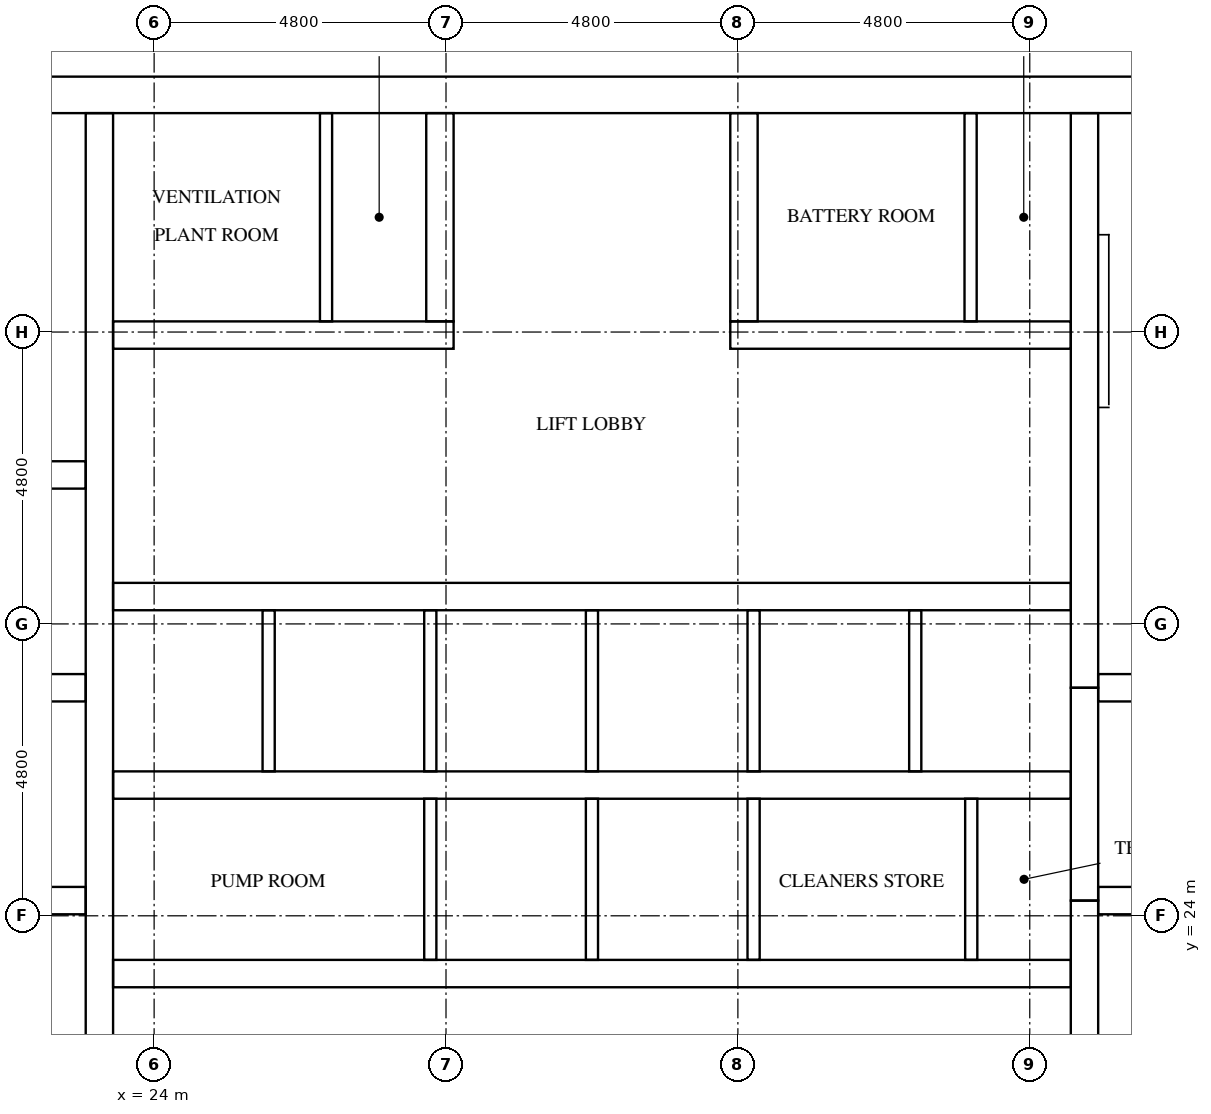
"""IFC4 building model, lengths in metres.
Left out: names, types, materials, properties, quantities, classifications, styles, units other than length and angle.
Written with IfcOpenShell. Run it as: python <this file> out.ifc"""

import sys

from ifc_helpers import new_model, si_unit, direction, frame, frame_2d, origin, place, context, subcontext, project, spatial, rectangle, extrude, element, fill, save


model = new_model("IFC4")
c1 = context("Model", 3, precision=1e-05, world=origin(), true_north=direction((0.0, 1.0)))
c2 = subcontext(c1, "Body", "Model", "MODEL_VIEW")
j1 = project(units=[si_unit("LENGTHUNIT", "METRE"), si_unit("PLANEANGLEUNIT", "RADIAN")], contexts=[c1])
p1 = place(None, origin())
s1 = spatial("IfcSite", under=j1, at=p1, CompositionType="ELEMENT")
p2 = place(p1, origin())
s2 = spatial("IfcBuilding", under=s1, at=p2, CompositionType="ELEMENT")
p3 = place(p2, frame((0.0, 0.0, 259.7)))
s3 = spatial("IfcBuildingStorey", under=s2, at=p3, CompositionType="ELEMENT", Elevation=259.7)
p4 = place(p3, frame((15.0, 37.5, 0.0), z_axis=(0.0, 0.0, 1.0), x_axis=(1.0, 0.0, 0.0)))
e1 = element("IfcWall", 1, at=p4, inside=s3, PredefinedType="SHEAR", context=c2, shape_type="SweptSolid", body=[
    extrude(rectangle(XDim=32.4, YDim=0.6, at=frame_2d((16.2, 0.0))), origin(), (0.0, 0.0, 1.0), 3.1),
])
p5 = place(p4, frame((15.3, 0.0, 0.0)))
e2 = element("IfcOpeningElement", 2, at=p5, cuts=e1, PredefinedType="OPENING", context=c2, shape_type="SweptSolid", body=[
    extrude(rectangle(XDim=1.8, YDim=2.1, at=frame_2d((0.9, 1.05))), frame((0.0, 0.31, 0.0), z_axis=(0.0, -1.0, 0.0), x_axis=(1.0, 0.0, 0.0)), (0.0, 0.0, 1.0), 0.62),
])
p6 = place(p4, frame((1.25, 0.0, 0.0)))
e3 = element("IfcOpeningElement", 3, at=p6, cuts=e1, PredefinedType="OPENING", context=c2, shape_type="SweptSolid", body=[
    extrude(rectangle(XDim=1.0, YDim=2.1, at=frame_2d((0.5, 1.05))), frame((0.0, 0.31, 0.0), z_axis=(0.0, -1.0, 0.0), x_axis=(1.0, 0.0, 0.0)), (0.0, 0.0, 1.0), 0.62),
])
p7 = place(p4, frame((4.988, 0.0, 0.0)))
e4 = element("IfcOpeningElement", 4, at=p7, cuts=e1, PredefinedType="OPENING", context=c2, shape_type="SweptSolid", body=[
    extrude(rectangle(XDim=1.0, YDim=2.1, at=frame_2d((0.5, 1.05))), frame((0.0, 0.31, 0.0), z_axis=(0.0, -1.0, 0.0), x_axis=(1.0, 0.0, 0.0)), (0.0, 0.0, 1.0), 0.62),
])
p8 = place(p3, frame((23.1, 15.6, 0.0), z_axis=(0.0, 0.0, 1.0), x_axis=(0.0, 1.0, 0.0)))
e5 = element("IfcWall", 5, at=p8, inside=s3, PredefinedType="SHEAR", context=c2, shape_type="SweptSolid", body=[
    extrude(rectangle(XDim=21.6, YDim=0.45, at=frame_2d((10.8, 0.0))), origin(), (0.0, 0.0, 1.0), 3.1),
])
p9 = place(p3, frame((39.3, 15.6, 0.0), z_axis=(0.0, 0.0, 1.0), x_axis=(0.0, 1.0, 0.0)))
e6 = element("IfcWall", 6, at=p9, inside=s3, PredefinedType="SHEAR", context=c2, shape_type="SweptSolid", body=[
    extrude(rectangle(XDim=8.65, YDim=0.45, at=frame_2d((4.325, 0.0))), origin(), (0.0, 0.0, 1.0), 3.1),
])
p10 = place(p3, frame((39.3, 24.25, 0.0), z_axis=(0.0, 0.0, 1.0), x_axis=(0.0, 1.0, 0.0)))
e7 = element("IfcWall", 7, at=p10, inside=s3, PredefinedType="SHEAR", context=c2, shape_type="SweptSolid", body=[
    extrude(rectangle(XDim=3.5, YDim=0.45, at=frame_2d((1.75, 0.0))), origin(), (0.0, 0.0, 1.0), 3.1),
])
p11 = place(p3, frame((39.3, 27.75, 0.0), z_axis=(0.0, 0.0, 1.0), x_axis=(0.0, 1.0, 0.0)))
e8 = element("IfcWall", 8, at=p11, inside=s3, PredefinedType="SHEAR", context=c2, shape_type="SweptSolid", body=[
    extrude(rectangle(XDim=9.45, YDim=0.45, at=frame_2d((4.725, 0.0))), origin(), (0.0, 0.0, 1.0), 3.1),
])
for number, where, z_axis, x_axis in (
    (9, (19.275, 24.25, 0.0), (0.0, 0.0, 1.0), (1.0, 0.0, 0.0)),
    (10, (19.275, 27.75, 0.0), (0.0, 0.0, 1.0), (1.0, 0.0, 0.0)),
):
    element("IfcWall", number, at=place(p3, frame(where, z_axis=z_axis, x_axis=x_axis)), inside=s3, PredefinedType="SHEAR", context=c2, shape_type="SweptSolid", body=[
        extrude(rectangle(XDim=3.6, YDim=0.45, at=frame_2d((1.8, 0.0))), origin(), (0.0, 0.0, 1.0), 3.1),
    ])
p12 = place(p3, frame((15.6, 31.25, 0.0), z_axis=(0.0, 0.0, 1.0), x_axis=(1.0, 0.0, 0.0)))
e11 = element("IfcWall", 11, at=p12, inside=s3, PredefinedType="SHEAR", context=c2, shape_type="SweptSolid", body=[
    extrude(rectangle(XDim=7.275, YDim=0.45, at=frame_2d((3.637, 0.0))), origin(), (0.0, 0.0, 1.0), 3.1),
])
for number, where, z_axis, x_axis in (
    (12, (39.525, 24.25, 0.0), (0.0, 0.0, 1.0), (1.0, 0.0, 0.0)),
    (13, (39.525, 27.75, 0.0), (0.0, 0.0, 1.0), (1.0, 0.0, 0.0)),
):
    element("IfcWall", number, at=place(p3, frame(where, z_axis=z_axis, x_axis=x_axis)), inside=s3, PredefinedType="SHEAR", context=c2, shape_type="SweptSolid", body=[
        extrude(rectangle(XDim=3.6, YDim=0.45, at=frame_2d((1.8, 0.0))), origin(), (0.0, 0.0, 1.0), 3.1),
    ])
p13 = place(p3, frame((23.325, 23.05, 0.0), z_axis=(0.0, 0.0, 1.0), x_axis=(1.0, 0.0, 0.0)))
e14 = element("IfcWall", 14, at=p13, inside=s3, PredefinedType="SHEAR", context=c2, shape_type="SweptSolid", body=[
    extrude(rectangle(XDim=15.75, YDim=0.45, at=frame_2d((7.875, 0.0))), origin(), (0.0, 0.0, 1.0), 3.1),
])
p14 = place(p13, frame((2.058, 0.0, 0.0)))
e15 = element("IfcOpeningElement", 15, at=p14, cuts=e14, PredefinedType="OPENING", context=c2, shape_type="SweptSolid", body=[
    extrude(rectangle(XDim=1.0, YDim=2.1, at=frame_2d((0.5, 1.05))), frame((0.0, 0.235, 0.0), z_axis=(0.0, -1.0, 0.0), x_axis=(1.0, 0.0, 0.0)), (0.0, 0.0, 1.0), 0.47),
])
p15 = place(p13, frame((11.823, 0.0, 0.0)))
e16 = element("IfcOpeningElement", 16, at=p15, cuts=e14, PredefinedType="OPENING", context=c2, shape_type="SweptSolid", body=[
    extrude(rectangle(XDim=1.0, YDim=2.1, at=frame_2d((0.5, 1.05))), frame((0.0, 0.235, 0.0), z_axis=(0.0, -1.0, 0.0), x_axis=(1.0, 0.0, 0.0)), (0.0, 0.0, 1.0), 0.47),
])
p16 = place(p13, frame((14.481, 0.0, 0.0)))
e17 = element("IfcOpeningElement", 17, at=p16, cuts=e14, PredefinedType="OPENING", context=c2, shape_type="SweptSolid", body=[
    extrude(rectangle(XDim=1.0, YDim=2.1, at=frame_2d((0.5, 1.05))), frame((0.0, 0.235, 0.0), z_axis=(0.0, -1.0, 0.0), x_axis=(1.0, 0.0, 0.0)), (0.0, 0.0, 1.0), 0.47),
])
p17 = place(p3, frame((23.325, 26.15, 0.0), z_axis=(0.0, 0.0, 1.0), x_axis=(1.0, 0.0, 0.0)))
e18 = element("IfcWall", 18, at=p17, inside=s3, PredefinedType="SHEAR", context=c2, shape_type="SweptSolid", body=[
    extrude(rectangle(XDim=15.75, YDim=0.45, at=frame_2d((7.875, 0.0))), origin(), (0.0, 0.0, 1.0), 3.1),
])
p18 = place(p3, frame((23.325, 29.25, 0.0), z_axis=(0.0, 0.0, 1.0), x_axis=(1.0, 0.0, 0.0)))
e19 = element("IfcWall", 19, at=p18, inside=s3, PredefinedType="SHEAR", context=c2, shape_type="SweptSolid", body=[
    extrude(rectangle(XDim=15.75, YDim=0.45, at=frame_2d((7.875, 0.0))), origin(), (0.0, 0.0, 1.0), 3.1),
])
p19 = place(p18, frame((0.679, 0.0, 0.0)))
e20 = element("IfcOpeningElement", 20, at=p19, cuts=e19, PredefinedType="OPENING", context=c2, shape_type="SweptSolid", body=[
    extrude(rectangle(XDim=1.1, YDim=2.1, at=frame_2d((0.55, 1.05))), frame((0.0, 0.235, 0.0), z_axis=(0.0, -1.0, 0.0), x_axis=(1.0, 0.0, 0.0)), (0.0, 0.0, 1.0), 0.47),
])
p20 = place(p18, frame((3.337, 0.0, 0.0)))
e21 = element("IfcOpeningElement", 21, at=p20, cuts=e19, PredefinedType="OPENING", context=c2, shape_type="SweptSolid", body=[
    extrude(rectangle(XDim=1.1, YDim=2.1, at=frame_2d((0.55, 1.05))), frame((0.0, 0.235, 0.0), z_axis=(0.0, -1.0, 0.0), x_axis=(1.0, 0.0, 0.0)), (0.0, 0.0, 1.0), 0.47),
])
p21 = place(p18, frame((5.996, 0.0, 0.0)))
e22 = element("IfcOpeningElement", 22, at=p21, cuts=e19, PredefinedType="OPENING", context=c2, shape_type="SweptSolid", body=[
    extrude(rectangle(XDim=1.1, YDim=2.1, at=frame_2d((0.55, 1.05))), frame((0.0, 0.235, 0.0), z_axis=(0.0, -1.0, 0.0), x_axis=(1.0, 0.0, 0.0)), (0.0, 0.0, 1.0), 0.47),
])
p22 = place(p18, frame((8.654, 0.0, 0.0)))
e23 = element("IfcOpeningElement", 23, at=p22, cuts=e19, PredefinedType="OPENING", context=c2, shape_type="SweptSolid", body=[
    extrude(rectangle(XDim=1.1, YDim=2.1, at=frame_2d((0.55, 1.05))), frame((0.0, 0.235, 0.0), z_axis=(0.0, -1.0, 0.0), x_axis=(1.0, 0.0, 0.0)), (0.0, 0.0, 1.0), 0.47),
])
p23 = place(p18, frame((11.312, 0.0, 0.0)))
e24 = element("IfcOpeningElement", 24, at=p23, cuts=e19, PredefinedType="OPENING", context=c2, shape_type="SweptSolid", body=[
    extrude(rectangle(XDim=1.1, YDim=2.1, at=frame_2d((0.55, 1.05))), frame((0.0, 0.235, 0.0), z_axis=(0.0, -1.0, 0.0), x_axis=(1.0, 0.0, 0.0)), (0.0, 0.0, 1.0), 0.47),
])
p24 = place(p18, frame((13.971, 0.0, 0.0)))
e25 = element("IfcOpeningElement", 25, at=p24, cuts=e19, PredefinedType="OPENING", context=c2, shape_type="SweptSolid", body=[
    extrude(rectangle(XDim=1.1, YDim=2.1, at=frame_2d((0.55, 1.05))), frame((0.0, 0.235, 0.0), z_axis=(0.0, -1.0, 0.0), x_axis=(1.0, 0.0, 0.0)), (0.0, 0.0, 1.0), 0.47),
])
p25 = place(p3, frame((23.325, 33.55, 0.0), z_axis=(0.0, 0.0, 1.0), x_axis=(1.0, 0.0, 0.0)))
e26 = element("IfcWall", 26, at=p25, inside=s3, PredefinedType="SHEAR", context=c2, shape_type="SweptSolid", body=[
    extrude(rectangle(XDim=5.6, YDim=0.45, at=frame_2d((2.8, 0.0))), origin(), (0.0, 0.0, 1.0), 3.1),
])
p26 = place(p25, frame((1.201, 0.0, 0.0)))
e27 = element("IfcOpeningElement", 27, at=p26, cuts=e26, PredefinedType="OPENING", context=c2, shape_type="SweptSolid", body=[
    extrude(rectangle(XDim=1.0, YDim=2.1, at=frame_2d((0.5, 1.05))), frame((0.0, 0.235, 0.0), z_axis=(0.0, -1.0, 0.0), x_axis=(1.0, 0.0, 0.0)), (0.0, 0.0, 1.0), 0.47),
])
p27 = place(p25, frame((3.876, 0.0, 0.0)))
e28 = element("IfcOpeningElement", 28, at=p27, cuts=e26, PredefinedType="OPENING", context=c2, shape_type="SweptSolid", body=[
    extrude(rectangle(XDim=1.0, YDim=2.1, at=frame_2d((0.5, 1.05))), frame((0.0, 0.235, 0.0), z_axis=(0.0, -1.0, 0.0), x_axis=(1.0, 0.0, 0.0)), (0.0, 0.0, 1.0), 0.47),
])
p28 = place(p3, frame((33.475, 33.55, 0.0), z_axis=(0.0, 0.0, 1.0), x_axis=(1.0, 0.0, 0.0)))
e29 = element("IfcWall", 29, at=p28, inside=s3, PredefinedType="SHEAR", context=c2, shape_type="SweptSolid", body=[
    extrude(rectangle(XDim=5.6, YDim=0.45, at=frame_2d((2.8, 0.0))), origin(), (0.0, 0.0, 1.0), 3.1),
])
p29 = place(p28, frame((1.651, 0.0, 0.0)))
e30 = element("IfcOpeningElement", 30, at=p29, cuts=e29, PredefinedType="OPENING", context=c2, shape_type="SweptSolid", body=[
    extrude(rectangle(XDim=1.0, YDim=2.1, at=frame_2d((0.5, 1.05))), frame((0.0, 0.235, 0.0), z_axis=(0.0, -1.0, 0.0), x_axis=(1.0, 0.0, 0.0)), (0.0, 0.0, 1.0), 0.47),
])
p30 = place(p28, frame((4.326, 0.0, 0.0)))
e31 = element("IfcOpeningElement", 31, at=p30, cuts=e29, PredefinedType="OPENING", context=c2, shape_type="SweptSolid", body=[
    extrude(rectangle(XDim=1.0, YDim=2.1, at=frame_2d((0.5, 1.05))), frame((0.0, 0.235, 0.0), z_axis=(0.0, -1.0, 0.0), x_axis=(1.0, 0.0, 0.0)), (0.0, 0.0, 1.0), 0.47),
])
for number, where, z_axis, x_axis in (
    (32, (28.7, 33.775, 0.0), (0.0, 0.0, 1.0), (0.0, 1.0, 0.0)),
    (33, (33.7, 33.775, 0.0), (0.0, 0.0, 1.0), (0.0, 1.0, 0.0)),
):
    element("IfcWall", number, at=place(p3, frame(where, z_axis=z_axis, x_axis=x_axis)), inside=s3, PredefinedType="SHEAR", context=c2, shape_type="SweptSolid", body=[
        extrude(rectangle(XDim=3.425, YDim=0.45, at=frame_2d((1.712, 0.0))), origin(), (0.0, 0.0, 1.0), 3.1),
    ])
p31 = place(p3, frame((25.883, 26.375, 0.0), z_axis=(0.0, 0.0, 1.0), x_axis=(0.0, 1.0, 0.0)))
e34 = element("IfcWall", 34, at=p31, inside=s3, PredefinedType="SOLIDWALL", context=c2, shape_type="SweptSolid", body=[
    extrude(rectangle(XDim=2.65, YDim=0.2, at=frame_2d((1.325, 0.0))), origin(), (0.0, 0.0, 1.0), 3.1),
])
p32 = place(p3, frame((28.542, 23.275, 0.0), z_axis=(0.0, 0.0, 1.0), x_axis=(0.0, 1.0, 0.0)))
e35 = element("IfcWall", 35, at=p32, inside=s3, PredefinedType="SOLIDWALL", context=c2, shape_type="SweptSolid", body=[
    extrude(rectangle(XDim=2.65, YDim=0.2, at=frame_2d((1.325, 0.0))), origin(), (0.0, 0.0, 1.0), 3.1),
])
p33 = place(p3, frame((28.542, 26.375, 0.0), z_axis=(0.0, 0.0, 1.0), x_axis=(0.0, 1.0, 0.0)))
e36 = element("IfcWall", 36, at=p33, inside=s3, PredefinedType="SOLIDWALL", context=c2, shape_type="SweptSolid", body=[
    extrude(rectangle(XDim=2.65, YDim=0.2, at=frame_2d((1.325, 0.0))), origin(), (0.0, 0.0, 1.0), 3.1),
])
p34 = place(p3, frame((31.2, 23.275, 0.0), z_axis=(0.0, 0.0, 1.0), x_axis=(0.0, 1.0, 0.0)))
e37 = element("IfcWall", 37, at=p34, inside=s3, PredefinedType="SOLIDWALL", context=c2, shape_type="SweptSolid", body=[
    extrude(rectangle(XDim=2.65, YDim=0.2, at=frame_2d((1.325, 0.0))), origin(), (0.0, 0.0, 1.0), 3.1),
])
p35 = place(p3, frame((31.2, 26.375, 0.0), z_axis=(0.0, 0.0, 1.0), x_axis=(0.0, 1.0, 0.0)))
e38 = element("IfcWall", 38, at=p35, inside=s3, PredefinedType="SOLIDWALL", context=c2, shape_type="SweptSolid", body=[
    extrude(rectangle(XDim=2.65, YDim=0.2, at=frame_2d((1.325, 0.0))), origin(), (0.0, 0.0, 1.0), 3.1),
])
p36 = place(p3, frame((33.858, 23.275, 0.0), z_axis=(0.0, 0.0, 1.0), x_axis=(0.0, 1.0, 0.0)))
e39 = element("IfcWall", 39, at=p36, inside=s3, PredefinedType="SOLIDWALL", context=c2, shape_type="SweptSolid", body=[
    extrude(rectangle(XDim=2.65, YDim=0.2, at=frame_2d((1.325, 0.0))), origin(), (0.0, 0.0, 1.0), 3.1),
])
for number, where, z_axis, x_axis in (
    (40, (33.858, 26.375, 0.0), (0.0, 0.0, 1.0), (0.0, 1.0, 0.0)),
    (41, (36.517, 26.375, 0.0), (0.0, 0.0, 1.0), (0.0, 1.0, 0.0)),
):
    element("IfcWall", number, at=place(p3, frame(where, z_axis=z_axis, x_axis=x_axis)), inside=s3, PredefinedType="SOLIDWALL", context=c2, shape_type="SweptSolid", body=[
        extrude(rectangle(XDim=2.65, YDim=0.2, at=frame_2d((1.325, 0.0))), origin(), (0.0, 0.0, 1.0), 3.1),
    ])
p37 = place(p3, frame((37.438, 23.275, 0.0), z_axis=(0.0, 0.0, 1.0), x_axis=(0.0, 1.0, 0.0)))
e42 = element("IfcWall", 42, at=p37, inside=s3, PredefinedType="PARTITIONING", context=c2, shape_type="SweptSolid", body=[
    extrude(rectangle(XDim=2.65, YDim=0.2, at=frame_2d((1.325, 0.0))), origin(), (0.0, 0.0, 1.0), 3.1),
])
for number, where, z_axis, x_axis in (
    (43, (26.827, 33.775, 0.0), (0.0, 0.0, 1.0), (0.0, 1.0, 0.0)),
    (44, (37.427, 33.775, 0.0), (0.0, 0.0, 1.0), (0.0, 1.0, 0.0)),
):
    element("IfcWall", number, at=place(p3, frame(where, z_axis=z_axis, x_axis=x_axis)), inside=s3, PredefinedType="PARTITIONING", context=c2, shape_type="SweptSolid", body=[
        extrude(rectangle(XDim=3.425, YDim=0.2, at=frame_2d((1.712, 0.0))), origin(), (0.0, 0.0, 1.0), 3.1),
    ])
p38 = place(p19, origin())
e45 = element("IfcDoor", 45, at=p38, inside=s3, OperationType="DOUBLE_DOOR_SLIDING", PredefinedType="DOOR", context=c2, shape_type="SweptSolid", body=[
    extrude(rectangle(XDim=1.1, YDim=2.1, at=frame_2d((0.55, 1.05))), frame((0.0, 0.025, 0.0), z_axis=(0.0, -1.0, 0.0), x_axis=(1.0, 0.0, 0.0)), (0.0, 0.0, 1.0), 0.05),
])
fill(e20, e45)
p39 = place(p20, origin())
e46 = element("IfcDoor", 46, at=p39, inside=s3, OperationType="DOUBLE_DOOR_SLIDING", PredefinedType="DOOR", context=c2, shape_type="SweptSolid", body=[
    extrude(rectangle(XDim=1.1, YDim=2.1, at=frame_2d((0.55, 1.05))), frame((0.0, 0.025, 0.0), z_axis=(0.0, -1.0, 0.0), x_axis=(1.0, 0.0, 0.0)), (0.0, 0.0, 1.0), 0.05),
])
fill(e21, e46)
p40 = place(p21, origin())
e47 = element("IfcDoor", 47, at=p40, inside=s3, OperationType="DOUBLE_DOOR_SLIDING", PredefinedType="DOOR", context=c2, shape_type="SweptSolid", body=[
    extrude(rectangle(XDim=1.1, YDim=2.1, at=frame_2d((0.55, 1.05))), frame((0.0, 0.025, 0.0), z_axis=(0.0, -1.0, 0.0), x_axis=(1.0, 0.0, 0.0)), (0.0, 0.0, 1.0), 0.05),
])
fill(e22, e47)
p41 = place(p22, origin())
e48 = element("IfcDoor", 48, at=p41, inside=s3, OperationType="DOUBLE_DOOR_SLIDING", PredefinedType="DOOR", context=c2, shape_type="SweptSolid", body=[
    extrude(rectangle(XDim=1.1, YDim=2.1, at=frame_2d((0.55, 1.05))), frame((0.0, 0.025, 0.0), z_axis=(0.0, -1.0, 0.0), x_axis=(1.0, 0.0, 0.0)), (0.0, 0.0, 1.0), 0.05),
])
fill(e23, e48)
p42 = place(p23, origin())
e49 = element("IfcDoor", 49, at=p42, inside=s3, OperationType="DOUBLE_DOOR_SLIDING", PredefinedType="DOOR", context=c2, shape_type="SweptSolid", body=[
    extrude(rectangle(XDim=1.1, YDim=2.1, at=frame_2d((0.55, 1.05))), frame((0.0, 0.025, 0.0), z_axis=(0.0, -1.0, 0.0), x_axis=(1.0, 0.0, 0.0)), (0.0, 0.0, 1.0), 0.05),
])
fill(e24, e49)
p43 = place(p24, origin())
e50 = element("IfcDoor", 50, at=p43, inside=s3, OperationType="DOUBLE_DOOR_SLIDING", PredefinedType="DOOR", context=c2, shape_type="SweptSolid", body=[
    extrude(rectangle(XDim=1.1, YDim=2.1, at=frame_2d((0.55, 1.05))), frame((0.0, 0.025, 0.0), z_axis=(0.0, -1.0, 0.0), x_axis=(1.0, 0.0, 0.0)), (0.0, 0.0, 1.0), 0.05),
])
fill(e25, e50)
p44 = place(p5, origin())
e51 = element("IfcDoor", 51, at=p44, inside=s3, OperationType="DOUBLE_DOOR_SINGLE_SWING", PredefinedType="DOOR", context=c2, shape_type="SweptSolid", body=[
    extrude(rectangle(XDim=1.8, YDim=2.1, at=frame_2d((0.9, 1.05))), frame((0.0, 0.025, 0.0), z_axis=(0.0, -1.0, 0.0), x_axis=(1.0, 0.0, 0.0)), (0.0, 0.0, 1.0), 0.05),
])
fill(e2, e51)
p45 = place(p14, frame((1.0, 0.0, 0.0), z_axis=(0.0, 0.0, 1.0), x_axis=(-1.0, 0.0, 0.0)))
e52 = element("IfcDoor", 52, at=p45, inside=s3, OperationType="SINGLE_SWING_LEFT", PredefinedType="DOOR", context=c2, shape_type="SweptSolid", body=[
    extrude(rectangle(XDim=1.0, YDim=2.1, at=frame_2d((0.5, 1.05))), frame((0.0, 0.025, 0.0), z_axis=(0.0, -1.0, 0.0), x_axis=(1.0, 0.0, 0.0)), (0.0, 0.0, 1.0), 0.05),
])
fill(e15, e52)
p46 = place(p15, frame((1.0, 0.0, 0.0), z_axis=(0.0, 0.0, 1.0), x_axis=(-1.0, 0.0, 0.0)))
e53 = element("IfcDoor", 53, at=p46, inside=s3, OperationType="SINGLE_SWING_RIGHT", PredefinedType="DOOR", context=c2, shape_type="SweptSolid", body=[
    extrude(rectangle(XDim=1.0, YDim=2.1, at=frame_2d((0.5, 1.05))), frame((0.0, 0.025, 0.0), z_axis=(0.0, -1.0, 0.0), x_axis=(1.0, 0.0, 0.0)), (0.0, 0.0, 1.0), 0.05),
])
fill(e16, e53)
p47 = place(p16, frame((1.0, 0.0, 0.0), z_axis=(0.0, 0.0, 1.0), x_axis=(-1.0, 0.0, 0.0)))
e54 = element("IfcDoor", 54, at=p47, inside=s3, OperationType="SINGLE_SWING_LEFT", PredefinedType="DOOR", context=c2, shape_type="SweptSolid", body=[
    extrude(rectangle(XDim=1.0, YDim=2.1, at=frame_2d((0.5, 1.05))), frame((0.0, 0.025, 0.0), z_axis=(0.0, -1.0, 0.0), x_axis=(1.0, 0.0, 0.0)), (0.0, 0.0, 1.0), 0.05),
])
fill(e17, e54)
p48 = place(p26, frame((1.0, 0.0, 0.0), z_axis=(0.0, 0.0, 1.0), x_axis=(-1.0, 0.0, 0.0)))
e55 = element("IfcDoor", 55, at=p48, inside=s3, OperationType="SINGLE_SWING_RIGHT", PredefinedType="DOOR", context=c2, shape_type="SweptSolid", body=[
    extrude(rectangle(XDim=1.0, YDim=2.1, at=frame_2d((0.5, 1.05))), frame((0.0, 0.025, 0.0), z_axis=(0.0, -1.0, 0.0), x_axis=(1.0, 0.0, 0.0)), (0.0, 0.0, 1.0), 0.05),
])
fill(e27, e55)
p49 = place(p27, frame((1.0, 0.0, 0.0), z_axis=(0.0, 0.0, 1.0), x_axis=(-1.0, 0.0, 0.0)))
e56 = element("IfcDoor", 56, at=p49, inside=s3, OperationType="SINGLE_SWING_LEFT", PredefinedType="DOOR", context=c2, shape_type="SweptSolid", body=[
    extrude(rectangle(XDim=1.0, YDim=2.1, at=frame_2d((0.5, 1.05))), frame((0.0, 0.025, 0.0), z_axis=(0.0, -1.0, 0.0), x_axis=(1.0, 0.0, 0.0)), (0.0, 0.0, 1.0), 0.05),
])
fill(e28, e56)
p50 = place(p29, frame((1.0, 0.0, 0.0), z_axis=(0.0, 0.0, 1.0), x_axis=(-1.0, 0.0, 0.0)))
e57 = element("IfcDoor", 57, at=p50, inside=s3, OperationType="SINGLE_SWING_RIGHT", PredefinedType="DOOR", context=c2, shape_type="SweptSolid", body=[
    extrude(rectangle(XDim=1.0, YDim=2.1, at=frame_2d((0.5, 1.05))), frame((0.0, 0.025, 0.0), z_axis=(0.0, -1.0, 0.0), x_axis=(1.0, 0.0, 0.0)), (0.0, 0.0, 1.0), 0.05),
])
fill(e30, e57)
p51 = place(p30, frame((1.0, 0.0, 0.0), z_axis=(0.0, 0.0, 1.0), x_axis=(-1.0, 0.0, 0.0)))
e58 = element("IfcDoor", 58, at=p51, inside=s3, OperationType="SINGLE_SWING_LEFT", PredefinedType="DOOR", context=c2, shape_type="SweptSolid", body=[
    extrude(rectangle(XDim=1.0, YDim=2.1, at=frame_2d((0.5, 1.05))), frame((0.0, 0.025, 0.0), z_axis=(0.0, -1.0, 0.0), x_axis=(1.0, 0.0, 0.0)), (0.0, 0.0, 1.0), 0.05),
])
fill(e31, e58)
save(model, sys.argv[1])
